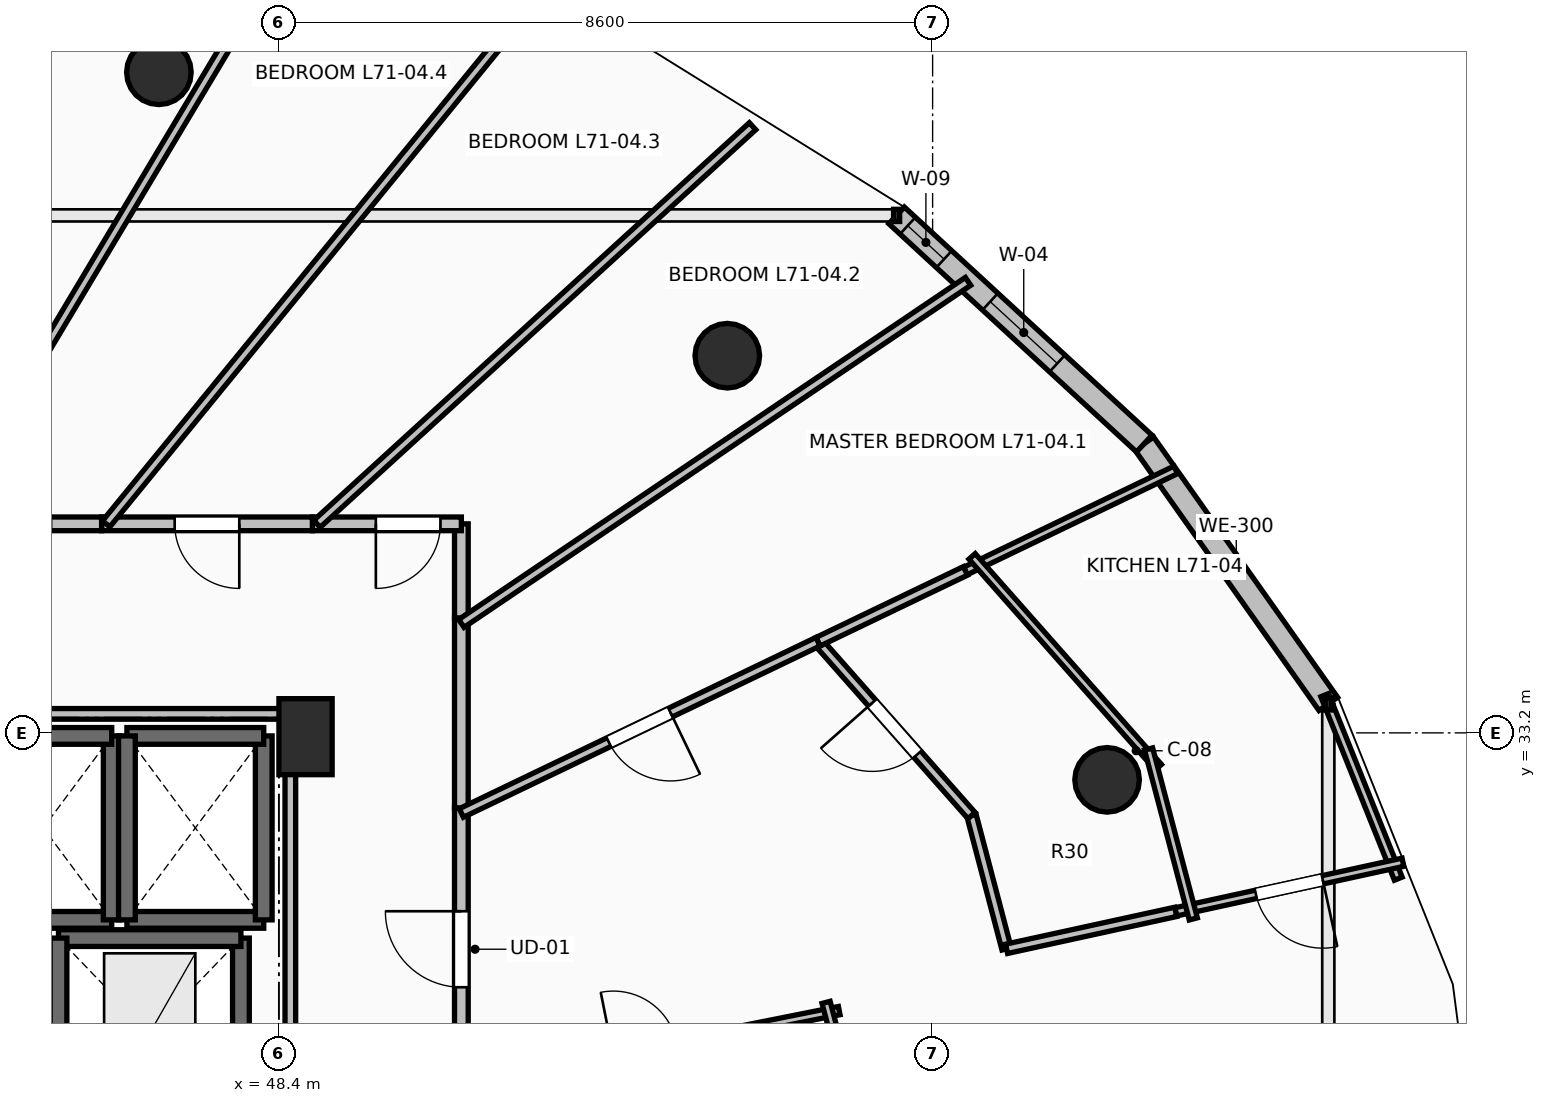
"""IFC4 building model, lengths in metres.
Left out: names, types, materials, properties, quantities, classifications, styles, units other than length and angle.
Written with IfcOpenShell. Run it as: python <this file> out.ifc"""

import sys

from ifc_helpers import new_model, si_unit, direction, frame, frame_2d, origin, origin_2d, place, context, subcontext, project, spatial, rectangle, circle, extrude, element, fill, save


model = new_model("IFC4")
c1 = context("Model", 3, precision=1e-05, world=origin(), true_north=direction((0.0, 1.0)))
c2 = subcontext(c1, "Body", "Model", "MODEL_VIEW")
j1 = project(units=[si_unit("LENGTHUNIT", "METRE"), si_unit("PLANEANGLEUNIT", "RADIAN")], contexts=[c1])
p1 = place(None, origin())
s1 = spatial("IfcSite", under=j1, at=p1, CompositionType="ELEMENT")
p2 = place(p1, origin())
s2 = spatial("IfcBuilding", under=s1, at=p2, CompositionType="ELEMENT")
p3 = place(p2, frame((0.0, 0.0, 262.65)))
s3 = spatial("IfcBuildingStorey", under=s2, at=p3, CompositionType="ELEMENT", Elevation=262.65)
for number, where, z_axis, x_axis in (
    (1, (59.295, 32.582, 0.0), (0.0, 0.0, 1.0), (0.924, 0.383, 0.0)),
    (2, (54.299, 38.162, 0.0), (0.0, 0.0, 1.0), (0.707, 0.707, 0.0)),
    (3, (46.821, 41.891, 0.0), (0.0, 0.0, 1.0), (0.383, 0.924, 0.0)),
):
    element("IfcColumn", number, at=place(p3, frame(where, z_axis=z_axis, x_axis=x_axis)), inside=s3, PredefinedType="COLUMN", context=c2, shape_type="SweptSolid", body=[
        extrude(circle(Radius=0.425, at=origin_2d()), origin(), (0.0, 0.0, 1.0), 3.55),
    ])
p4 = place(p3, frame((48.75, 33.15, 0.0), z_axis=(0.0, 0.0, 1.0), x_axis=(1.0, 0.0, 0.0)))
e4 = element("IfcColumn", 4, at=p4, inside=s3, PredefinedType="PILASTER", context=c2, shape_type="SweptSolid", body=[
    extrude(rectangle(XDim=0.7, YDim=1.0, at=origin_2d()), origin(), (0.0, 0.0, 1.0), 3.55),
])
p5 = place(p3, frame((62.206, 33.581, 0.0), z_axis=(0.0, 0.0, 1.0), x_axis=(-0.577261247247, 0.816559521668, 0.0)))
e5 = element("IfcWall", 5, at=p5, inside=s3, PredefinedType="STANDARD", context=c2, shape_type="SweptSolid", body=[
    extrude(rectangle(XDim=4.194, YDim=0.3, at=frame_2d((2.097, 0.0))), origin(), (0.0, 0.0, 1.0), 3.29),
])
p6 = place(p3, frame((59.784, 37.006, 0.0), z_axis=(0.0, 0.0, 1.0), x_axis=(-0.735445373611, 0.677584018727, 0.0)))
e6 = element("IfcWall", 6, at=p6, inside=s3, PredefinedType="STANDARD", context=c2, shape_type="SweptSolid", body=[
    extrude(rectangle(XDim=4.43, YDim=0.3, at=frame_2d((2.215, 0.0))), origin(), (0.0, 0.0, 1.0), 3.29),
])
p7 = place(p6, frame((1.556, 0.0, 0.85)))
e7 = element("IfcOpeningElement", 7, at=p7, cuts=e6, PredefinedType="OPENING", context=c2, shape_type="SweptSolid", body=[
    extrude(rectangle(XDim=1.2, YDim=1.95, at=frame_2d((0.6, 0.975))), frame((0.0, 0.165, 0.0), z_axis=(0.0, -1.0, 0.0), x_axis=(1.0, 0.0, 0.0)), (0.0, 0.0, 1.0), 0.33),
])
p8 = place(p6, frame((3.581, 0.0, 0.85)))
e8 = element("IfcOpeningElement", 8, at=p8, cuts=e6, PredefinedType="OPENING", context=c2, shape_type="SweptSolid", body=[
    extrude(rectangle(XDim=0.65, YDim=1.8, at=frame_2d((0.325, 0.9))), frame((0.0, 0.165, 0.0), z_axis=(0.0, -1.0, 0.0), x_axis=(1.0, 0.0, 0.0)), (0.0, 0.0, 1.0), 0.33),
])
p9 = place(p3, frame((44.4, 30.74, 0.0), z_axis=(0.0, 0.0, 1.0), x_axis=(1.0, 0.0, 0.0)))
e9 = element("IfcWall", 9, at=p9, inside=s3, PredefinedType="SOLIDWALL", context=c2, shape_type="SweptSolid", body=[
    extrude(rectangle(XDim=1.8, YDim=0.22, at=frame_2d((0.9, 0.0))), origin(), (0.0, 0.0, 1.0), 3.29),
])
p10 = place(p3, frame((46.2, 30.74, 0.0), z_axis=(0.0, 0.0, 1.0), x_axis=(0.0, 1.0, 0.0)))
e10 = element("IfcWall", 10, at=p10, inside=s3, PredefinedType="SOLIDWALL", context=c2, shape_type="SweptSolid", body=[
    extrude(rectangle(XDim=2.42, YDim=0.22, at=frame_2d((1.21, 0.0))), origin(), (0.0, 0.0, 1.0), 3.29),
])
for number, where, z_axis, x_axis in (
    (11, (46.2, 33.16, 0.0), (0.0, 0.0, 1.0), (-1.0, 0.0, 0.0)),
    (12, (46.4, 30.74, 0.0), (0.0, 0.0, 1.0), (1.0, 0.0, 0.0)),
):
    element("IfcWall", number, at=place(p3, frame(where, z_axis=z_axis, x_axis=x_axis)), inside=s3, PredefinedType="SOLIDWALL", context=c2, shape_type="SweptSolid", body=[
        extrude(rectangle(XDim=1.8, YDim=0.22, at=frame_2d((0.9, 0.0))), origin(), (0.0, 0.0, 1.0), 3.29),
    ])
p11 = place(p3, frame((48.2, 30.74, 0.0), z_axis=(0.0, 0.0, 1.0), x_axis=(0.0, 1.0, 0.0)))
e13 = element("IfcWall", 13, at=p11, inside=s3, PredefinedType="SOLIDWALL", context=c2, shape_type="SweptSolid", body=[
    extrude(rectangle(XDim=2.42, YDim=0.22, at=frame_2d((1.21, 0.0))), origin(), (0.0, 0.0, 1.0), 3.29),
])
p12 = place(p3, frame((48.2, 33.16, 0.0), z_axis=(0.0, 0.0, 1.0), x_axis=(-1.0, 0.0, 0.0)))
e14 = element("IfcWall", 14, at=p12, inside=s3, PredefinedType="SOLIDWALL", context=c2, shape_type="SweptSolid", body=[
    extrude(rectangle(XDim=1.8, YDim=0.22, at=frame_2d((0.9, 0.0))), origin(), (0.0, 0.0, 1.0), 3.29),
])
p13 = place(p3, frame((46.4, 33.16, 0.0), z_axis=(0.0, 0.0, 1.0), x_axis=(0.0, -1.0, 0.0)))
e15 = element("IfcWall", 15, at=p13, inside=s3, PredefinedType="SOLIDWALL", context=c2, shape_type="SweptSolid", body=[
    extrude(rectangle(XDim=2.42, YDim=0.22, at=frame_2d((1.21, 0.0))), origin(), (0.0, 0.0, 1.0), 3.29),
])
p14 = place(p3, frame((47.9, 28.0, 0.0), z_axis=(0.0, 0.0, 1.0), x_axis=(0.0, 1.0, 0.0)))
e16 = element("IfcWall", 16, at=p14, inside=s3, PredefinedType="SHEAR", context=c2, shape_type="SweptSolid", body=[
    extrude(rectangle(XDim=2.5, YDim=0.22, at=frame_2d((1.25, 0.0))), origin(), (0.0, 0.0, 1.0), 3.29),
])
p15 = place(p3, frame((47.9, 30.5, 0.0), z_axis=(0.0, 0.0, 1.0), x_axis=(-1.0, 0.0, 0.0)))
e17 = element("IfcWall", 17, at=p15, inside=s3, PredefinedType="SHEAR", context=c2, shape_type="SweptSolid", body=[
    extrude(rectangle(XDim=2.4, YDim=0.22, at=frame_2d((1.2, 0.0))), origin(), (0.0, 0.0, 1.0), 3.29),
])
p16 = place(p3, frame((45.5, 30.5, 0.0), z_axis=(0.0, 0.0, 1.0), x_axis=(0.0, -1.0, 0.0)))
e18 = element("IfcWall", 18, at=p16, inside=s3, PredefinedType="SHEAR", context=c2, shape_type="SweptSolid", body=[
    extrude(rectangle(XDim=2.5, YDim=0.22, at=frame_2d((1.25, 0.0))), origin(), (0.0, 0.0, 1.0), 3.29),
])
p17 = place(p3, frame((50.8, 28.494, 0.0), z_axis=(0.0, 0.0, 1.0), x_axis=(0.0, 1.0, 0.0)))
e19 = element("IfcWall", 19, at=p17, inside=s3, PredefinedType="PARTITIONING", context=c2, shape_type="SweptSolid", body=[
    extrude(rectangle(XDim=3.719, YDim=0.18, at=frame_2d((1.859, 0.0))), origin(), (0.0, 0.0, 1.0), 3.29),
])
p18 = place(p17, frame((1.36, 0.0, 0.0)))
e20 = element("IfcOpeningElement", 20, at=p18, cuts=e19, PredefinedType="OPENING", context=c2, shape_type="SweptSolid", body=[
    extrude(rectangle(XDim=1.0, YDim=2.15, at=frame_2d((0.5, 1.075))), frame((0.0, 0.105, 0.0), z_axis=(0.0, -1.0, 0.0), x_axis=(1.0, 0.0, 0.0)), (0.0, 0.0, 1.0), 0.21),
])
p19 = place(p3, frame((50.8, 32.213, 0.0), z_axis=(0.0, 0.0, 1.0), x_axis=(0.0, 1.0, 0.0)))
e21 = element("IfcWall", 21, at=p19, inside=s3, PredefinedType="PARTITIONING", context=c2, shape_type="SweptSolid", body=[
    extrude(rectangle(XDim=2.499, YDim=0.18, at=frame_2d((1.25, 0.0))), origin(), (0.0, 0.0, 1.0), 2.482),
])
p20 = place(p3, frame((50.8, 34.712, 0.0), z_axis=(0.0, 0.0, 1.0), x_axis=(0.0, 1.0, 0.0)))
e22 = element("IfcWall", 22, at=p20, inside=s3, PredefinedType="PARTITIONING", context=c2, shape_type="SweptSolid", body=[
    extrude(rectangle(XDim=1.238, YDim=0.18, at=frame_2d((0.619, 0.0))), origin(), (0.0, 0.0, 1.0), 2.482),
])
p21 = place(p3, frame((50.8, 35.95, 0.0), z_axis=(0.0, 0.0, 1.0), x_axis=(-1.0, 0.0, 0.0)))
e23 = element("IfcWall", 23, at=p21, inside=s3, PredefinedType="PARTITIONING", context=c2, shape_type="SweptSolid", body=[
    extrude(rectangle(XDim=1.96, YDim=0.18, at=frame_2d((0.98, 0.0))), origin(), (0.0, 0.0, 1.0), 2.936),
])
p22 = place(p21, frame((0.275, 0.0, 0.0)))
e24 = element("IfcOpeningElement", 24, at=p22, cuts=e23, PredefinedType="OPENING", context=c2, shape_type="SweptSolid", body=[
    extrude(rectangle(XDim=0.85, YDim=2.1, at=frame_2d((0.425, 1.05))), frame((0.0, 0.105, 0.0), z_axis=(0.0, -1.0, 0.0), x_axis=(1.0, 0.0, 0.0)), (0.0, 0.0, 1.0), 0.21),
])
p23 = place(p3, frame((48.84, 35.95, 0.0), z_axis=(0.0, 0.0, 1.0), x_axis=(-1.0, 0.0, 0.0)))
e25 = element("IfcWall", 25, at=p23, inside=s3, PredefinedType="PARTITIONING", context=c2, shape_type="SweptSolid", body=[
    extrude(rectangle(XDim=2.773, YDim=0.18, at=frame_2d((1.387, 0.0))), origin(), (0.0, 0.0, 1.0), 2.482),
])
p24 = place(p23, frame((0.961, 0.0, 0.0)))
e26 = element("IfcOpeningElement", 26, at=p24, cuts=e25, PredefinedType="OPENING", context=c2, shape_type="SweptSolid", body=[
    extrude(rectangle(XDim=0.85, YDim=2.1, at=frame_2d((0.425, 1.05))), frame((0.0, 0.105, 0.0), z_axis=(0.0, -1.0, 0.0), x_axis=(1.0, 0.0, 0.0)), (0.0, 0.0, 1.0), 0.21),
])
p25 = place(p3, frame((46.067, 35.95, 0.0), z_axis=(0.0, 0.0, 1.0), x_axis=(-1.0, 0.0, 0.0)))
e27 = element("IfcWall", 27, at=p25, inside=s3, PredefinedType="PARTITIONING", context=c2, shape_type="SweptSolid", body=[
    extrude(rectangle(XDim=2.179, YDim=0.18, at=frame_2d((1.089, 0.0))), origin(), (0.0, 0.0, 1.0), 3.29),
])
p26 = place(p25, frame((0.665, 0.0, 0.0)))
e28 = element("IfcOpeningElement", 28, at=p26, cuts=e27, PredefinedType="OPENING", context=c2, shape_type="SweptSolid", body=[
    extrude(rectangle(XDim=0.85, YDim=2.1, at=frame_2d((0.425, 1.05))), frame((0.0, 0.105, 0.0), z_axis=(0.0, -1.0, 0.0), x_axis=(1.0, 0.0, 0.0)), (0.0, 0.0, 1.0), 0.21),
])
p27 = place(p3, frame((50.663, 28.527, 0.0), z_axis=(0.0, 0.0, 1.0), x_axis=(0.980652709614, 0.195755620935, 0.0)))
e29 = element("IfcWall", 29, at=p27, inside=s3, PredefinedType="PARTITIONING", context=c2, shape_type="SweptSolid", body=[
    extrude(rectangle(XDim=5.209, YDim=0.11, at=frame_2d((2.605, 0.0))), origin(), (0.0, 0.0, 1.0), 2.936),
])
p28 = place(p27, frame((2.18, 0.0, 0.0)))
e30 = element("IfcOpeningElement", 30, at=p28, cuts=e29, PredefinedType="OPENING", context=c2, shape_type="SweptSolid", body=[
    extrude(rectangle(XDim=0.85, YDim=2.1, at=frame_2d((0.425, 1.05))), frame((0.0, 0.07, 0.0), z_axis=(0.0, -1.0, 0.0), x_axis=(1.0, 0.0, 0.0)), (0.0, 0.0, 1.0), 0.14),
])
p29 = place(p3, frame((55.598, 29.654, 0.0), z_axis=(0.0, 0.0, 1.0), x_axis=(0.25449329928, -0.967074537263, 0.0)))
e31 = element("IfcWall", 31, at=p29, inside=s3, PredefinedType="PARTITIONING", context=c2, shape_type="SweptSolid", body=[
    extrude(rectangle(XDim=3.919, YDim=0.11, at=frame_2d((1.959, 0.0))), origin(), (0.0, 0.0, 1.0), 2.482),
])
p30 = place(p3, frame((57.432, 35.33, 0.0), z_axis=(0.0, 0.0, 1.0), x_axis=(0.90133305384, 0.43312668592, 0.0)))
e32 = element("IfcWall", 32, at=p30, inside=s3, PredefinedType="PARTITIONING", context=c2, shape_type="SweptSolid", body=[
    extrude(rectangle(XDim=3.069, YDim=0.11, at=frame_2d((1.535, 0.0))), origin(), (0.0, 0.0, 1.0), 3.29),
])
p31 = place(p3, frame((63.126, 31.282, 0.0), z_axis=(0.0, 0.0, 1.0), x_axis=(-0.371940924939, 0.92825640227, 0.0)))
e33 = element("IfcWall", 33, at=p31, inside=s3, PredefinedType="PARTITIONING", context=c2, shape_type="SweptSolid", body=[
    extrude(rectangle(XDim=2.601, YDim=0.11, at=frame_2d((1.3, 0.0))), origin(), (0.0, 0.0, 1.0), 3.29),
])
p32 = place(p3, frame((63.188, 31.498, 0.0), z_axis=(0.0, 0.0, 1.0), x_axis=(-0.976993096252, -0.213270930688, 0.0)))
e34 = element("IfcWall", 34, at=p32, inside=s3, PredefinedType="PARTITIONING", context=c2, shape_type="SweptSolid", body=[
    extrude(rectangle(XDim=3.06, YDim=0.11, at=frame_2d((1.53, 0.0))), origin(), (0.0, 0.0, 1.0), 3.29),
])
p33 = place(p32, frame((1.08, 0.0, 0.0)))
e35 = element("IfcOpeningElement", 35, at=p33, cuts=e34, PredefinedType="OPENING", context=c2, shape_type="SweptSolid", body=[
    extrude(rectangle(XDim=0.9, YDim=2.1, at=frame_2d((0.45, 1.05))), frame((0.0, 0.07, 0.0), z_axis=(0.0, -1.0, 0.0), x_axis=(1.0, 0.0, 0.0)), (0.0, 0.0, 1.0), 0.14),
])
p34 = place(p3, frame((57.973, 30.359, 0.0), z_axis=(0.0, 0.0, 1.0), x_axis=(-0.254274526126, 0.967132082687, 0.0)))
e36 = element("IfcWall", 36, at=p34, inside=s3, PredefinedType="PARTITIONING", context=c2, shape_type="SweptSolid", body=[
    extrude(rectangle(XDim=1.813, YDim=0.125, at=frame_2d((0.906, 0.0))), origin(), (0.0, 0.0, 1.0), 3.29),
])
p35 = place(p3, frame((57.512, 32.112, 0.0), z_axis=(0.0, 0.0, 1.0), x_axis=(-0.662026430628, 0.749480490173, 0.0)))
e37 = element("IfcWall", 37, at=p35, inside=s3, PredefinedType="PARTITIONING", context=c2, shape_type="SweptSolid", body=[
    extrude(rectangle(XDim=3.051, YDim=0.125, at=frame_2d((1.526, 0.0))), origin(), (0.0, 0.0, 1.0), 2.482),
])
p36 = place(p35, frame((1.076, 0.0, 0.0)))
e38 = element("IfcOpeningElement", 38, at=p36, cuts=e37, PredefinedType="OPENING", context=c2, shape_type="SweptSolid", body=[
    extrude(rectangle(XDim=0.9, YDim=2.1, at=frame_2d((0.45, 1.05))), frame((0.0, 0.077, 0.0), z_axis=(0.0, -1.0, 0.0), x_axis=(1.0, 0.0, 0.0)), (0.0, 0.0, 1.0), 0.155),
])
p37 = place(p3, frame((55.492, 34.399, 0.0), z_axis=(0.0, 0.0, 1.0), x_axis=(0.901372521065, 0.433044545363, 0.0)))
e39 = element("IfcWall", 39, at=p37, inside=s3, PredefinedType="PARTITIONING", context=c2, shape_type="SweptSolid", body=[
    extrude(rectangle(XDim=2.152, YDim=0.125, at=frame_2d((1.076, 0.0))), origin(), (0.0, 0.0, 1.0), 2.874),
])
p38 = place(p3, frame((60.198, 30.845, 0.0), z_axis=(0.0, 0.0, 1.0), x_axis=(-0.976965000645, -0.213399595862, 0.0)))
e40 = element("IfcWall", 40, at=p38, inside=s3, PredefinedType="PARTITIONING", context=c2, shape_type="SweptSolid", body=[
    extrude(rectangle(XDim=2.278, YDim=0.125, at=frame_2d((1.139, 0.0))), origin(), (0.0, 0.0, 1.0), 2.874),
])
p39 = place(p3, frame((55.492, 34.399, 0.0), z_axis=(0.0, 0.0, 1.0), x_axis=(-0.901416162018, -0.432953695968, 0.0)))
e41 = element("IfcWall", 41, at=p39, inside=s3, PredefinedType="PARTITIONING", context=c2, shape_type="SweptSolid", body=[
    extrude(rectangle(XDim=5.205, YDim=0.125, at=frame_2d((2.603, 0.0))), origin(), (0.0, 0.0, 1.0), 2.482),
])
p40 = place(p39, frame((2.152, 0.0, 0.0)))
e42 = element("IfcOpeningElement", 42, at=p40, cuts=e41, PredefinedType="OPENING", context=c2, shape_type="SweptSolid", body=[
    extrude(rectangle(XDim=0.9, YDim=2.1, at=frame_2d((0.45, 1.05))), frame((0.0, 0.077, 0.0), z_axis=(0.0, -1.0, 0.0), x_axis=(1.0, 0.0, 0.0)), (0.0, 0.0, 1.0), 0.155),
])
p41 = place(p3, frame((57.519, 35.522, 0.0), z_axis=(0.0, 0.0, 1.0), x_axis=(0.662055665853, -0.749454665281, 0.0)))
e43 = element("IfcWall", 43, at=p41, inside=s3, PredefinedType="PARTITIONING", context=c2, shape_type="SweptSolid", body=[
    extrude(rectangle(XDim=3.701, YDim=0.11, at=frame_2d((1.851, 0.0))), origin(), (0.0, 0.0, 1.0), 3.29),
])
p42 = place(p3, frame((59.841, 32.988, 0.0), z_axis=(0.0, 0.0, 1.0), x_axis=(0.254519291204, -0.967067696909, 0.0)))
e44 = element("IfcWall", 44, at=p42, inside=s3, PredefinedType="PARTITIONING", context=c2, shape_type="SweptSolid", body=[
    extrude(rectangle(XDim=2.312, YDim=0.11, at=frame_2d((1.156, 0.0))), origin(), (0.0, 0.0, 1.0), 3.29),
])
p43 = place(p3, frame((57.466, 39.14, 0.0), z_axis=(0.0, 0.0, 1.0), x_axis=(-0.828823335801, -0.559510391352, 0.0)))
e45 = element("IfcWall", 45, at=p43, inside=s3, PredefinedType="PARTITIONING", context=c2, shape_type="SweptSolid", body=[
    extrude(rectangle(XDim=8.043, YDim=0.125, at=frame_2d((4.021, 0.0))), origin(), (0.0, 0.0, 1.0), 2.482),
])
p44 = place(p3, frame((54.631, 41.181, 0.0), z_axis=(0.0, 0.0, 1.0), x_axis=(-0.73860604902, -0.674137303783, 0.0)))
e46 = element("IfcWall", 46, at=p44, inside=s3, PredefinedType="PARTITIONING", context=c2, shape_type="SweptSolid", body=[
    extrude(rectangle(XDim=7.76, YDim=0.125, at=frame_2d((3.88, 0.0))), origin(), (0.0, 0.0, 1.0), 2.874),
])
p45 = place(p3, frame((51.725, 42.804, 0.0), z_axis=(0.0, 0.0, 1.0), x_axis=(-0.632582563989, -0.774492930721, 0.0)))
e47 = element("IfcWall", 47, at=p45, inside=s3, PredefinedType="PARTITIONING", context=c2, shape_type="SweptSolid", body=[
    extrude(rectangle(XDim=8.85, YDim=0.125, at=frame_2d((4.425, 0.0))), origin(), (0.0, 0.0, 1.0), 2.482),
])
p46 = place(p3, frame((48.762, 44.004, 0.0), z_axis=(0.0, 0.0, 1.0), x_axis=(-0.51305247577, -0.858357243289, 0.0)))
e48 = element("IfcWall", 48, at=p46, inside=s3, PredefinedType="PARTITIONING", context=c2, shape_type="SweptSolid", body=[
    extrude(rectangle(XDim=9.383, YDim=0.125, at=frame_2d((4.691, 0.0))), origin(), (0.0, 0.0, 1.0), 2.482),
])
p47 = place(p3, frame((48.55, 28.196, 0.0), z_axis=(0.0, 0.0, 1.0), x_axis=(0.0, 1.0, 0.0)))
e49 = element("IfcWall", 49, at=p47, inside=s3, PredefinedType="PARTITIONING", context=c2, shape_type="SweptSolid", body=[
    extrude(rectangle(XDim=5.254, YDim=0.14, at=frame_2d((2.627, 0.0))), origin(), (0.0, 0.0, 1.0), 2.482),
])
p48 = place(p3, frame((48.55, 33.45, 0.0), z_axis=(0.0, 0.0, 1.0), x_axis=(-1.0, 0.0, 0.0)))
e50 = element("IfcWall", 50, at=p48, inside=s3, PredefinedType="PARTITIONING", context=c2, shape_type="SweptSolid", body=[
    extrude(rectangle(XDim=4.21, YDim=0.14, at=frame_2d((2.105, 0.0))), origin(), (0.0, 0.0, 1.0), 2.482),
])
p49 = place(p3, frame((45.793, 44.813, 0.0), z_axis=(0.0, 0.0, 1.0), x_axis=(-0.382733290986, -0.923858878818, 0.0)))
e51 = element("IfcWall", 51, at=p49, inside=s3, PredefinedType="PARTITIONING", context=c2, shape_type="SweptSolid", body=[
    extrude(rectangle(XDim=4.653, YDim=0.14, at=frame_2d((2.327, 0.0))), origin(), (0.0, 0.0, 1.0), 2.874),
])
p50 = place(p7, origin())
e52 = element("IfcWindow", 52, at=p50, inside=s3, PartitioningType="SINGLE_PANEL", PredefinedType="WINDOW", context=c2, shape_type="SweptSolid", body=[
    extrude(rectangle(XDim=1.2, YDim=1.95, at=frame_2d((0.6, 0.975))), frame((0.0, 0.03, 0.0), z_axis=(0.0, -1.0, 0.0), x_axis=(1.0, 0.0, 0.0)), (0.0, 0.0, 1.0), 0.06),
])
fill(e7, e52)
p51 = place(p8, origin())
e53 = element("IfcWindow", 53, at=p51, inside=s3, PartitioningType="SINGLE_PANEL", PredefinedType="WINDOW", context=c2, shape_type="SweptSolid", body=[
    extrude(rectangle(XDim=0.65, YDim=1.8, at=frame_2d((0.325, 0.9))), frame((0.0, 0.03, 0.0), z_axis=(0.0, -1.0, 0.0), x_axis=(1.0, 0.0, 0.0)), (0.0, 0.0, 1.0), 0.06),
])
fill(e8, e53)
p52 = place(p18, origin())
e54 = element("IfcDoor", 54, at=p52, inside=s3, OperationType="SINGLE_SWING_RIGHT", PredefinedType="DOOR", context=c2, shape_type="SweptSolid", body=[
    extrude(rectangle(XDim=1.0, YDim=2.15, at=frame_2d((0.5, 1.075))), frame((0.0, 0.025, 0.0), z_axis=(0.0, -1.0, 0.0), x_axis=(1.0, 0.0, 0.0)), (0.0, 0.0, 1.0), 0.05),
])
fill(e20, e54)
p53 = place(p33, origin())
e55 = element("IfcDoor", 55, at=p53, inside=s3, OperationType="SINGLE_SWING_LEFT", PredefinedType="DOOR", context=c2, shape_type="SweptSolid", body=[
    extrude(rectangle(XDim=0.9, YDim=2.1, at=frame_2d((0.45, 1.05))), frame((0.0, 0.025, 0.0), z_axis=(0.0, -1.0, 0.0), x_axis=(1.0, 0.0, 0.0)), (0.0, 0.0, 1.0), 0.05),
])
fill(e35, e55)
p54 = place(p36, origin())
e56 = element("IfcDoor", 56, at=p54, inside=s3, OperationType="SINGLE_SWING_RIGHT", PredefinedType="DOOR", context=c2, shape_type="SweptSolid", body=[
    extrude(rectangle(XDim=0.9, YDim=2.1, at=frame_2d((0.45, 1.05))), frame((0.0, 0.025, 0.0), z_axis=(0.0, -1.0, 0.0), x_axis=(1.0, 0.0, 0.0)), (0.0, 0.0, 1.0), 0.05),
])
fill(e38, e56)
p55 = place(p40, origin())
e57 = element("IfcDoor", 57, at=p55, inside=s3, OperationType="SINGLE_SWING_LEFT", PredefinedType="DOOR", context=c2, shape_type="SweptSolid", body=[
    extrude(rectangle(XDim=0.9, YDim=2.1, at=frame_2d((0.45, 1.05))), frame((0.0, 0.025, 0.0), z_axis=(0.0, -1.0, 0.0), x_axis=(1.0, 0.0, 0.0)), (0.0, 0.0, 1.0), 0.05),
])
fill(e42, e57)
p56 = place(p22, origin())
e58 = element("IfcDoor", 58, at=p56, inside=s3, OperationType="SINGLE_SWING_RIGHT", PredefinedType="DOOR", context=c2, shape_type="SweptSolid", body=[
    extrude(rectangle(XDim=0.85, YDim=2.1, at=frame_2d((0.425, 1.05))), frame((0.0, 0.025, 0.0), z_axis=(0.0, -1.0, 0.0), x_axis=(1.0, 0.0, 0.0)), (0.0, 0.0, 1.0), 0.05),
])
fill(e24, e58)
p57 = place(p24, origin())
e59 = element("IfcDoor", 59, at=p57, inside=s3, OperationType="SINGLE_SWING_LEFT", PredefinedType="DOOR", context=c2, shape_type="SweptSolid", body=[
    extrude(rectangle(XDim=0.85, YDim=2.1, at=frame_2d((0.425, 1.05))), frame((0.0, 0.025, 0.0), z_axis=(0.0, -1.0, 0.0), x_axis=(1.0, 0.0, 0.0)), (0.0, 0.0, 1.0), 0.05),
])
fill(e26, e59)
save(model, sys.argv[1])
